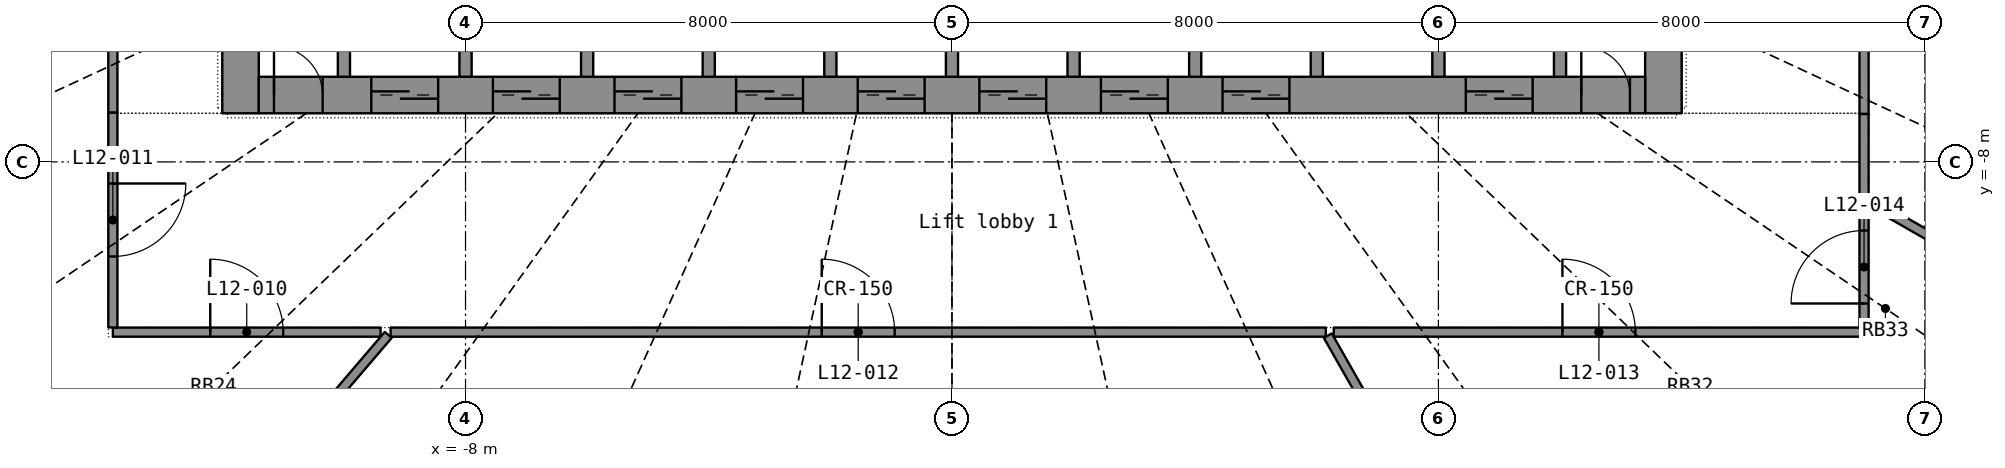
"""IFC4 building model, lengths in metres.
Left out: names, types, materials, properties, quantities, classifications, styles, units other than length and angle.
Written with IfcOpenShell. Run it as: python <this file> out.ifc"""

import sys

from ifc_helpers import new_model, si_unit, direction, frame, frame_2d, origin, place, context, subcontext, project, spatial, rectangle, extrude, element, fill, save


model = new_model("IFC4")
c1 = context("Model", 3, precision=1e-05, world=origin(), true_north=direction((0.0, 1.0)))
c2 = subcontext(c1, "Body", "Model", "MODEL_VIEW")
j1 = project(units=[si_unit("LENGTHUNIT", "METRE"), si_unit("PLANEANGLEUNIT", "RADIAN")], contexts=[c1])
p1 = place(None, origin())
s1 = spatial("IfcSite", under=j1, at=p1, CompositionType="ELEMENT")
p2 = place(p1, origin())
s2 = spatial("IfcBuilding", under=s1, at=p2, CompositionType="ELEMENT")
p3 = place(p2, frame((0.0, 0.0, 55.6)))
s3 = spatial("IfcBuildingStorey", under=s2, at=p3, CompositionType="ELEMENT", Elevation=55.6)
p4 = place(p3, frame((-11.7, -7.2, 0.0), z_axis=(0.0, 0.0, 1.0), x_axis=(0.0, 1.0, 0.0)))
e1 = element("IfcWall", 1, at=p4, inside=s3, PredefinedType="SHEAR", context=c2, shape_type="SweptSolid", body=[
    extrude(rectangle(XDim=14.4, YDim=0.6, at=frame_2d((7.2, 0.0))), origin(), (0.0, 0.0, 1.0), 3.3),
])
p5 = place(p4, frame((6.5, 0.0, 0.0)))
e2 = element("IfcOpeningElement", 2, at=p5, cuts=e1, PredefinedType="OPENING", context=c2, shape_type="SweptSolid", body=[
    extrude(rectangle(XDim=1.4, YDim=2.2, at=frame_2d((0.7, 1.1))), frame((0.0, 0.31, 0.0), z_axis=(0.0, -1.0, 0.0), x_axis=(1.0, 0.0, 0.0)), (0.0, 0.0, 1.0), 0.62),
])
p6 = place(p3, frame((11.7, -7.2, 0.0), z_axis=(0.0, 0.0, 1.0), x_axis=(0.0, 1.0, 0.0)))
e3 = element("IfcWall", 3, at=p6, inside=s3, PredefinedType="SHEAR", context=c2, shape_type="SweptSolid", body=[
    extrude(rectangle(XDim=14.4, YDim=0.6, at=frame_2d((7.2, 0.0))), origin(), (0.0, 0.0, 1.0), 3.3),
])
p7 = place(p6, frame((6.5, 0.0, 0.0)))
e4 = element("IfcOpeningElement", 4, at=p7, cuts=e3, PredefinedType="OPENING", context=c2, shape_type="SweptSolid", body=[
    extrude(rectangle(XDim=1.4, YDim=2.2, at=frame_2d((0.7, 1.1))), frame((0.0, 0.31, 0.0), z_axis=(0.0, -1.0, 0.0), x_axis=(1.0, 0.0, 0.0)), (0.0, 0.0, 1.0), 0.62),
])
p8 = place(p3, frame((-11.4, -6.9, 0.0), z_axis=(0.0, 0.0, 1.0), x_axis=(1.0, 0.0, 0.0)))
e5 = element("IfcWall", 5, at=p8, inside=s3, PredefinedType="SHEAR", context=c2, shape_type="SweptSolid", body=[
    extrude(rectangle(XDim=22.8, YDim=0.6, at=frame_2d((11.4, 0.0))), origin(), (0.0, 0.0, 1.0), 3.3),
])
p9 = place(p8, frame((1.85, 0.0, 0.0)))
e6 = element("IfcOpeningElement", 6, at=p9, cuts=e5, PredefinedType="OPENING", context=c2, shape_type="SweptSolid", body=[
    extrude(rectangle(XDim=1.1, YDim=2.2, at=frame_2d((0.55, 1.1))), frame((0.0, 0.31, 0.0), z_axis=(0.0, -1.0, 0.0), x_axis=(1.0, 0.0, 0.0)), (0.0, 0.0, 1.0), 0.62),
])
p10 = place(p8, frame((3.85, 0.0, 0.0)))
e7 = element("IfcOpeningElement", 7, at=p10, cuts=e5, PredefinedType="OPENING", context=c2, shape_type="SweptSolid", body=[
    extrude(rectangle(XDim=1.1, YDim=2.2, at=frame_2d((0.55, 1.1))), frame((0.0, 0.31, 0.0), z_axis=(0.0, -1.0, 0.0), x_axis=(1.0, 0.0, 0.0)), (0.0, 0.0, 1.0), 0.62),
])
p11 = place(p8, frame((5.85, 0.0, 0.0)))
e8 = element("IfcOpeningElement", 8, at=p11, cuts=e5, PredefinedType="OPENING", context=c2, shape_type="SweptSolid", body=[
    extrude(rectangle(XDim=1.1, YDim=2.2, at=frame_2d((0.55, 1.1))), frame((0.0, 0.31, 0.0), z_axis=(0.0, -1.0, 0.0), x_axis=(1.0, 0.0, 0.0)), (0.0, 0.0, 1.0), 0.62),
])
p12 = place(p8, frame((7.85, 0.0, 0.0)))
e9 = element("IfcOpeningElement", 9, at=p12, cuts=e5, PredefinedType="OPENING", context=c2, shape_type="SweptSolid", body=[
    extrude(rectangle(XDim=1.1, YDim=2.2, at=frame_2d((0.55, 1.1))), frame((0.0, 0.31, 0.0), z_axis=(0.0, -1.0, 0.0), x_axis=(1.0, 0.0, 0.0)), (0.0, 0.0, 1.0), 0.62),
])
p13 = place(p8, frame((9.85, 0.0, 0.0)))
e10 = element("IfcOpeningElement", 10, at=p13, cuts=e5, PredefinedType="OPENING", context=c2, shape_type="SweptSolid", body=[
    extrude(rectangle(XDim=1.1, YDim=2.2, at=frame_2d((0.55, 1.1))), frame((0.0, 0.31, 0.0), z_axis=(0.0, -1.0, 0.0), x_axis=(1.0, 0.0, 0.0)), (0.0, 0.0, 1.0), 0.62),
])
p14 = place(p8, frame((11.85, 0.0, 0.0)))
e11 = element("IfcOpeningElement", 11, at=p14, cuts=e5, PredefinedType="OPENING", context=c2, shape_type="SweptSolid", body=[
    extrude(rectangle(XDim=1.1, YDim=2.2, at=frame_2d((0.55, 1.1))), frame((0.0, 0.31, 0.0), z_axis=(0.0, -1.0, 0.0), x_axis=(1.0, 0.0, 0.0)), (0.0, 0.0, 1.0), 0.62),
])
p15 = place(p8, frame((13.85, 0.0, 0.0)))
e12 = element("IfcOpeningElement", 12, at=p15, cuts=e5, PredefinedType="OPENING", context=c2, shape_type="SweptSolid", body=[
    extrude(rectangle(XDim=1.1, YDim=2.2, at=frame_2d((0.55, 1.1))), frame((0.0, 0.31, 0.0), z_axis=(0.0, -1.0, 0.0), x_axis=(1.0, 0.0, 0.0)), (0.0, 0.0, 1.0), 0.62),
])
p16 = place(p8, frame((15.85, 0.0, 0.0)))
e13 = element("IfcOpeningElement", 13, at=p16, cuts=e5, PredefinedType="OPENING", context=c2, shape_type="SweptSolid", body=[
    extrude(rectangle(XDim=1.1, YDim=2.2, at=frame_2d((0.55, 1.1))), frame((0.0, 0.31, 0.0), z_axis=(0.0, -1.0, 0.0), x_axis=(1.0, 0.0, 0.0)), (0.0, 0.0, 1.0), 0.62),
])
p17 = place(p8, frame((19.85, 0.0, 0.0)))
e14 = element("IfcOpeningElement", 14, at=p17, cuts=e5, PredefinedType="OPENING", context=c2, shape_type="SweptSolid", body=[
    extrude(rectangle(XDim=1.1, YDim=2.2, at=frame_2d((0.55, 1.1))), frame((0.0, 0.31, 0.0), z_axis=(0.0, -1.0, 0.0), x_axis=(1.0, 0.0, 0.0)), (0.0, 0.0, 1.0), 0.62),
])
p18 = place(p8, frame((0.25, 0.0, 0.0)))
e15 = element("IfcOpeningElement", 15, at=p18, cuts=e5, PredefinedType="OPENING", context=c2, shape_type="SweptSolid", body=[
    extrude(rectangle(XDim=0.8, YDim=2.05, at=frame_2d((0.4, 1.025))), frame((0.0, 0.31, 0.0), z_axis=(0.0, -1.0, 0.0), x_axis=(1.0, 0.0, 0.0)), (0.0, 0.0, 1.0), 0.62),
])
p19 = place(p8, frame((21.75, 0.0, 0.0)))
e16 = element("IfcOpeningElement", 16, at=p19, cuts=e5, PredefinedType="OPENING", context=c2, shape_type="SweptSolid", body=[
    extrude(rectangle(XDim=0.8, YDim=2.05, at=frame_2d((0.4, 1.025))), frame((0.0, 0.31, 0.0), z_axis=(0.0, -1.0, 0.0), x_axis=(1.0, 0.0, 0.0)), (0.0, 0.0, 1.0), 0.62),
])
for number, where, z_axis, x_axis in (
    (17, (-10.0, -6.6, 0.0), (0.0, 0.0, 1.0), (0.0, 1.0, 0.0)),
    (18, (-8.0, -6.6, 0.0), (0.0, 0.0, 1.0), (0.0, 1.0, 0.0)),
    (19, (-6.0, -6.6, 0.0), (0.0, 0.0, 1.0), (0.0, 1.0, 0.0)),
    (20, (-4.0, -6.6, 0.0), (0.0, 0.0, 1.0), (0.0, 1.0, 0.0)),
    (21, (-2.0, -6.6, 0.0), (0.0, 0.0, 1.0), (0.0, 1.0, 0.0)),
    (22, (0.0, -6.6, 0.0), (0.0, 0.0, 1.0), (0.0, 1.0, 0.0)),
    (23, (2.0, -6.6, 0.0), (0.0, 0.0, 1.0), (0.0, 1.0, 0.0)),
    (24, (4.0, -6.6, 0.0), (0.0, 0.0, 1.0), (0.0, 1.0, 0.0)),
    (25, (6.0, -6.6, 0.0), (0.0, 0.0, 1.0), (0.0, 1.0, 0.0)),
    (26, (8.0, -6.6, 0.0), (0.0, 0.0, 1.0), (0.0, 1.0, 0.0)),
    (27, (10.0, -6.6, 0.0), (0.0, 0.0, 1.0), (0.0, 1.0, 0.0)),
):
    element("IfcWall", number, at=place(p3, frame(where, z_axis=z_axis, x_axis=x_axis)), inside=s3, PredefinedType="SHEAR", context=c2, shape_type="SweptSolid", body=[
        extrude(rectangle(XDim=2.7, YDim=0.2, at=frame_2d((1.35, 0.0))), origin(), (0.0, 0.0, 1.0), 3.3),
    ])
p20 = place(p3, frame((-9.232, -10.8, 0.0), z_axis=(0.0, 0.0, 1.0), x_axis=(1.0, 0.0, 0.0)))
e28 = element("IfcWall", 28, at=p20, inside=s3, PredefinedType="PARTITIONING", context=c2, shape_type="SweptSolid", body=[
    extrude(rectangle(XDim=15.381, YDim=0.15, at=frame_2d((7.69, 0.0))), origin(), (0.0, 0.0, 1.0), 2.4),
])
p21 = place(p20, frame((7.09, 0.0, 0.0)))
e29 = element("IfcOpeningElement", 29, at=p21, cuts=e28, PredefinedType="OPENING", context=c2, shape_type="SweptSolid", body=[
    extrude(rectangle(XDim=1.2, YDim=2.2, at=frame_2d((0.6, 1.1))), frame((0.0, 0.085, 0.0), z_axis=(0.0, -1.0, 0.0), x_axis=(1.0, 0.0, 0.0)), (0.0, 0.0, 1.0), 0.17),
])
p22 = place(p3, frame((-24.974, -9.539, 0.0), z_axis=(0.0, 0.0, 1.0), x_axis=(0.934173736, 0.356818485, 0.0)))
e30 = element("IfcWall", 30, at=p22, inside=s3, PredefinedType="PARTITIONING", context=c2, shape_type="SweptSolid", body=[
    extrude(rectangle(XDim=11.961, YDim=0.15, at=frame_2d((5.981, 0.0))), origin(), (0.0, 0.0, 1.0), 2.4),
])
p23 = place(p3, frame((11.638, -20.444, 0.0), z_axis=(0.0, 0.0, 1.0), x_axis=(-0.494736706, 0.869042917, 0.0)))
e31 = element("IfcWall", 31, at=p23, inside=s3, PredefinedType="PARTITIONING", context=c2, shape_type="SweptSolid", body=[
    extrude(rectangle(XDim=11.03, YDim=0.15, at=frame_2d((5.515, 0.0))), origin(), (0.0, 0.0, 1.0), 2.4),
])
p24 = place(p3, frame((-15.798, -18.48, 0.0), z_axis=(0.0, 0.0, 1.0), x_axis=(0.649794059, 0.760110308, 0.0)))
e32 = element("IfcWall", 32, at=p24, inside=s3, PredefinedType="PARTITIONING", context=c2, shape_type="SweptSolid", body=[
    extrude(rectangle(XDim=10.045, YDim=0.15, at=frame_2d((5.022, 0.0))), origin(), (0.0, 0.0, 1.0), 2.4),
])
p25 = place(p3, frame((6.279, -10.8, 0.0), z_axis=(0.0, 0.0, 1.0), x_axis=(1.0, 0.0, 0.0)))
e33 = element("IfcWall", 33, at=p25, inside=s3, PredefinedType="PARTITIONING", context=c2, shape_type="SweptSolid", body=[
    extrude(rectangle(XDim=8.721, YDim=0.15, at=frame_2d((4.36, 0.0))), origin(), (0.0, 0.0, 1.0), 2.4),
])
p26 = place(p25, frame((3.76, 0.0, 0.0)))
e34 = element("IfcOpeningElement", 34, at=p26, cuts=e33, PredefinedType="OPENING", context=c2, shape_type="SweptSolid", body=[
    extrude(rectangle(XDim=1.2, YDim=2.2, at=frame_2d((0.6, 1.1))), frame((0.0, 0.085, 0.0), z_axis=(0.0, -1.0, 0.0), x_axis=(1.0, 0.0, 0.0)), (0.0, 0.0, 1.0), 0.17),
])
p27 = place(p3, frame((22.571, -12.945, 0.0), z_axis=(0.0, 0.0, 1.0), x_axis=(-0.867458802, 0.497509022, 0.0)))
e35 = element("IfcWall", 35, at=p27, inside=s3, PredefinedType="PARTITIONING", context=c2, shape_type="SweptSolid", body=[
    extrude(rectangle(XDim=8.728, YDim=0.15, at=frame_2d((4.364, 0.0))), origin(), (0.0, 0.0, 1.0), 2.4),
])
p28 = place(p3, frame((15.0, -7.212, 0.0), z_axis=(0.0, 0.0, 1.0), x_axis=(0.0, 1.0, 0.0)))
e36 = element("IfcWall", 36, at=p28, inside=s3, PredefinedType="PARTITIONING", context=c2, shape_type="SweptSolid", body=[
    extrude(rectangle(XDim=6.054, YDim=0.15, at=frame_2d((3.027, 0.0))), origin(), (0.0, 0.0, 1.0), 2.4),
])
p29 = place(p28, frame((2.427, 0.0, 0.0)))
e37 = element("IfcOpeningElement", 37, at=p29, cuts=e36, PredefinedType="OPENING", context=c2, shape_type="SweptSolid", body=[
    extrude(rectangle(XDim=1.2, YDim=2.2, at=frame_2d((0.6, 1.1))), frame((0.0, 0.085, 0.0), z_axis=(0.0, -1.0, 0.0), x_axis=(1.0, 0.0, 0.0)), (0.0, 0.0, 1.0), 0.17),
])
p30 = place(p3, frame((-13.8, -10.8, 0.0), z_axis=(0.0, 0.0, 1.0), x_axis=(1.0, 0.0, 0.0)))
e38 = element("IfcWall", 38, at=p30, inside=s3, PredefinedType="PARTITIONING", context=c2, shape_type="SweptSolid", body=[
    extrude(rectangle(XDim=4.403, YDim=0.15, at=frame_2d((2.202, 0.0))), origin(), (0.0, 0.0, 1.0), 2.4),
])
p31 = place(p30, frame((1.602, 0.0, 0.0)))
e39 = element("IfcOpeningElement", 39, at=p31, cuts=e38, PredefinedType="OPENING", context=c2, shape_type="SweptSolid", body=[
    extrude(rectangle(XDim=1.2, YDim=2.2, at=frame_2d((0.6, 1.1))), frame((0.0, 0.085, 0.0), z_axis=(0.0, -1.0, 0.0), x_axis=(1.0, 0.0, 0.0)), (0.0, 0.0, 1.0), 0.17),
])
p32 = place(p3, frame((-13.8, -7.188, 0.0), z_axis=(0.0, 0.0, 1.0), x_axis=(0.0, -1.0, 0.0)))
e40 = element("IfcWall", 40, at=p32, inside=s3, PredefinedType="PARTITIONING", context=c2, shape_type="SweptSolid", body=[
    extrude(rectangle(XDim=3.535, YDim=0.15, at=frame_2d((1.768, 0.0))), origin(), (0.0, 0.0, 1.0), 2.4),
])
p33 = place(p32, frame((1.167, 0.0, 0.0)))
e41 = element("IfcOpeningElement", 41, at=p33, cuts=e40, PredefinedType="OPENING", context=c2, shape_type="SweptSolid", body=[
    extrude(rectangle(XDim=1.2, YDim=2.2, at=frame_2d((0.6, 1.1))), frame((0.0, 0.085, 0.0), z_axis=(0.0, -1.0, 0.0), x_axis=(1.0, 0.0, 0.0)), (0.0, 0.0, 1.0), 0.17),
])
p34 = place(p3, frame((15.0, -10.723, 0.0), z_axis=(0.0, 0.0, 1.0), x_axis=(0.0, 1.0, 0.0)))
e42 = element("IfcWall", 42, at=p34, inside=s3, PredefinedType="PARTITIONING", context=c2, shape_type="SweptSolid", body=[
    extrude(rectangle(XDim=1.988, YDim=0.15, at=frame_2d((0.994, 0.0))), origin(), (0.0, 0.0, 1.0), 2.4),
])
p35 = place(p34, frame((0.394, 0.0, 0.0)))
e43 = element("IfcOpeningElement", 43, at=p35, cuts=e42, PredefinedType="OPENING", context=c2, shape_type="SweptSolid", body=[
    extrude(rectangle(XDim=1.2, YDim=2.2, at=frame_2d((0.6, 1.1))), frame((0.0, 0.085, 0.0), z_axis=(0.0, -1.0, 0.0), x_axis=(1.0, 0.0, 0.0)), (0.0, 0.0, 1.0), 0.17),
])
p36 = place(p3, frame((-13.8, -5.382, 0.0), z_axis=(0.0, 0.0, 1.0), x_axis=(0.0, -1.0, 0.0)))
e44 = element("IfcWall", 44, at=p36, inside=s3, PredefinedType="PARTITIONING", context=c2, shape_type="SweptSolid", body=[
    extrude(rectangle(XDim=1.805, YDim=0.15, at=frame_2d((0.902, 0.0))), origin(), (0.0, 0.0, 1.0), 2.4),
])
p37 = place(p3, frame((15.0, -8.536, 0.0), z_axis=(0.0, 0.0, 1.0), x_axis=(0.0, 1.0, 0.0)))
e45 = element("IfcWall", 45, at=p37, inside=s3, PredefinedType="PARTITIONING", context=c2, shape_type="SweptSolid", body=[
    extrude(rectangle(XDim=1.323, YDim=0.15, at=frame_2d((0.662, 0.0))), origin(), (0.0, 0.0, 1.0), 2.4),
])
p38 = place(p9, origin())
e46 = element("IfcDoor", 46, at=p38, inside=s3, OperationType="DOUBLE_DOOR_SLIDING", PredefinedType="DOOR", context=c2, shape_type="SweptSolid", body=[
    extrude(rectangle(XDim=1.1, YDim=2.2, at=frame_2d((0.55, 1.1))), frame((0.0, 0.025, 0.0), z_axis=(0.0, -1.0, 0.0), x_axis=(1.0, 0.0, 0.0)), (0.0, 0.0, 1.0), 0.05),
])
fill(e6, e46)
p39 = place(p10, origin())
e47 = element("IfcDoor", 47, at=p39, inside=s3, OperationType="DOUBLE_DOOR_SLIDING", PredefinedType="DOOR", context=c2, shape_type="SweptSolid", body=[
    extrude(rectangle(XDim=1.1, YDim=2.2, at=frame_2d((0.55, 1.1))), frame((0.0, 0.025, 0.0), z_axis=(0.0, -1.0, 0.0), x_axis=(1.0, 0.0, 0.0)), (0.0, 0.0, 1.0), 0.05),
])
fill(e7, e47)
p40 = place(p11, origin())
e48 = element("IfcDoor", 48, at=p40, inside=s3, OperationType="DOUBLE_DOOR_SLIDING", PredefinedType="DOOR", context=c2, shape_type="SweptSolid", body=[
    extrude(rectangle(XDim=1.1, YDim=2.2, at=frame_2d((0.55, 1.1))), frame((0.0, 0.025, 0.0), z_axis=(0.0, -1.0, 0.0), x_axis=(1.0, 0.0, 0.0)), (0.0, 0.0, 1.0), 0.05),
])
fill(e8, e48)
p41 = place(p12, origin())
e49 = element("IfcDoor", 49, at=p41, inside=s3, OperationType="DOUBLE_DOOR_SLIDING", PredefinedType="DOOR", context=c2, shape_type="SweptSolid", body=[
    extrude(rectangle(XDim=1.1, YDim=2.2, at=frame_2d((0.55, 1.1))), frame((0.0, 0.025, 0.0), z_axis=(0.0, -1.0, 0.0), x_axis=(1.0, 0.0, 0.0)), (0.0, 0.0, 1.0), 0.05),
])
fill(e9, e49)
p42 = place(p13, origin())
e50 = element("IfcDoor", 50, at=p42, inside=s3, OperationType="DOUBLE_DOOR_SLIDING", PredefinedType="DOOR", context=c2, shape_type="SweptSolid", body=[
    extrude(rectangle(XDim=1.1, YDim=2.2, at=frame_2d((0.55, 1.1))), frame((0.0, 0.025, 0.0), z_axis=(0.0, -1.0, 0.0), x_axis=(1.0, 0.0, 0.0)), (0.0, 0.0, 1.0), 0.05),
])
fill(e10, e50)
p43 = place(p14, origin())
e51 = element("IfcDoor", 51, at=p43, inside=s3, OperationType="DOUBLE_DOOR_SLIDING", PredefinedType="DOOR", context=c2, shape_type="SweptSolid", body=[
    extrude(rectangle(XDim=1.1, YDim=2.2, at=frame_2d((0.55, 1.1))), frame((0.0, 0.025, 0.0), z_axis=(0.0, -1.0, 0.0), x_axis=(1.0, 0.0, 0.0)), (0.0, 0.0, 1.0), 0.05),
])
fill(e11, e51)
p44 = place(p15, origin())
e52 = element("IfcDoor", 52, at=p44, inside=s3, OperationType="DOUBLE_DOOR_SLIDING", PredefinedType="DOOR", context=c2, shape_type="SweptSolid", body=[
    extrude(rectangle(XDim=1.1, YDim=2.2, at=frame_2d((0.55, 1.1))), frame((0.0, 0.025, 0.0), z_axis=(0.0, -1.0, 0.0), x_axis=(1.0, 0.0, 0.0)), (0.0, 0.0, 1.0), 0.05),
])
fill(e12, e52)
p45 = place(p16, origin())
e53 = element("IfcDoor", 53, at=p45, inside=s3, OperationType="DOUBLE_DOOR_SLIDING", PredefinedType="DOOR", context=c2, shape_type="SweptSolid", body=[
    extrude(rectangle(XDim=1.1, YDim=2.2, at=frame_2d((0.55, 1.1))), frame((0.0, 0.025, 0.0), z_axis=(0.0, -1.0, 0.0), x_axis=(1.0, 0.0, 0.0)), (0.0, 0.0, 1.0), 0.05),
])
fill(e13, e53)
p46 = place(p17, origin())
e54 = element("IfcDoor", 54, at=p46, inside=s3, OperationType="DOUBLE_DOOR_SLIDING", PredefinedType="DOOR", context=c2, shape_type="SweptSolid", body=[
    extrude(rectangle(XDim=1.1, YDim=2.2, at=frame_2d((0.55, 1.1))), frame((0.0, 0.025, 0.0), z_axis=(0.0, -1.0, 0.0), x_axis=(1.0, 0.0, 0.0)), (0.0, 0.0, 1.0), 0.05),
])
fill(e14, e54)
p47 = place(p18, origin())
e55 = element("IfcDoor", 55, at=p47, inside=s3, OperationType="SINGLE_SWING_LEFT", PredefinedType="DOOR", context=c2, shape_type="SweptSolid", body=[
    extrude(rectangle(XDim=0.8, YDim=2.05, at=frame_2d((0.4, 1.025))), frame((0.0, 0.025, 0.0), z_axis=(0.0, -1.0, 0.0), x_axis=(1.0, 0.0, 0.0)), (0.0, 0.0, 1.0), 0.05),
])
fill(e15, e55)
p48 = place(p19, origin())
e56 = element("IfcDoor", 56, at=p48, inside=s3, OperationType="SINGLE_SWING_LEFT", PredefinedType="DOOR", context=c2, shape_type="SweptSolid", body=[
    extrude(rectangle(XDim=0.8, YDim=2.05, at=frame_2d((0.4, 1.025))), frame((0.0, 0.025, 0.0), z_axis=(0.0, -1.0, 0.0), x_axis=(1.0, 0.0, 0.0)), (0.0, 0.0, 1.0), 0.05),
])
fill(e16, e56)
p49 = place(p31, origin())
e57 = element("IfcDoor", 57, at=p49, inside=s3, OperationType="DOUBLE_DOOR_SINGLE_SWING", PredefinedType="DOOR", context=c2, shape_type="SweptSolid", body=[
    extrude(rectangle(XDim=1.2, YDim=2.2, at=frame_2d((0.6, 1.1))), frame((0.0, 0.025, 0.0), z_axis=(0.0, -1.0, 0.0), x_axis=(1.0, 0.0, 0.0)), (0.0, 0.0, 1.0), 0.05),
])
fill(e39, e57)
p50 = place(p33, origin())
e58 = element("IfcDoor", 58, at=p50, inside=s3, OperationType="DOUBLE_DOOR_SINGLE_SWING", PredefinedType="DOOR", context=c2, shape_type="SweptSolid", body=[
    extrude(rectangle(XDim=1.2, YDim=2.2, at=frame_2d((0.6, 1.1))), frame((0.0, 0.025, 0.0), z_axis=(0.0, -1.0, 0.0), x_axis=(1.0, 0.0, 0.0)), (0.0, 0.0, 1.0), 0.05),
])
fill(e41, e58)
p51 = place(p21, origin())
e59 = element("IfcDoor", 59, at=p51, inside=s3, OperationType="DOUBLE_DOOR_SINGLE_SWING", PredefinedType="DOOR", context=c2, shape_type="SweptSolid", body=[
    extrude(rectangle(XDim=1.2, YDim=2.2, at=frame_2d((0.6, 1.1))), frame((0.0, 0.025, 0.0), z_axis=(0.0, -1.0, 0.0), x_axis=(1.0, 0.0, 0.0)), (0.0, 0.0, 1.0), 0.05),
])
fill(e29, e59)
p52 = place(p26, origin())
e60 = element("IfcDoor", 60, at=p52, inside=s3, OperationType="DOUBLE_DOOR_SINGLE_SWING", PredefinedType="DOOR", context=c2, shape_type="SweptSolid", body=[
    extrude(rectangle(XDim=1.2, YDim=2.2, at=frame_2d((0.6, 1.1))), frame((0.0, 0.025, 0.0), z_axis=(0.0, -1.0, 0.0), x_axis=(1.0, 0.0, 0.0)), (0.0, 0.0, 1.0), 0.05),
])
fill(e34, e60)
p53 = place(p35, origin())
e61 = element("IfcDoor", 61, at=p53, inside=s3, OperationType="DOUBLE_DOOR_SINGLE_SWING", PredefinedType="DOOR", context=c2, shape_type="SweptSolid", body=[
    extrude(rectangle(XDim=1.2, YDim=2.2, at=frame_2d((0.6, 1.1))), frame((0.0, 0.025, 0.0), z_axis=(0.0, -1.0, 0.0), x_axis=(1.0, 0.0, 0.0)), (0.0, 0.0, 1.0), 0.05),
])
fill(e43, e61)
save(model, sys.argv[1])
